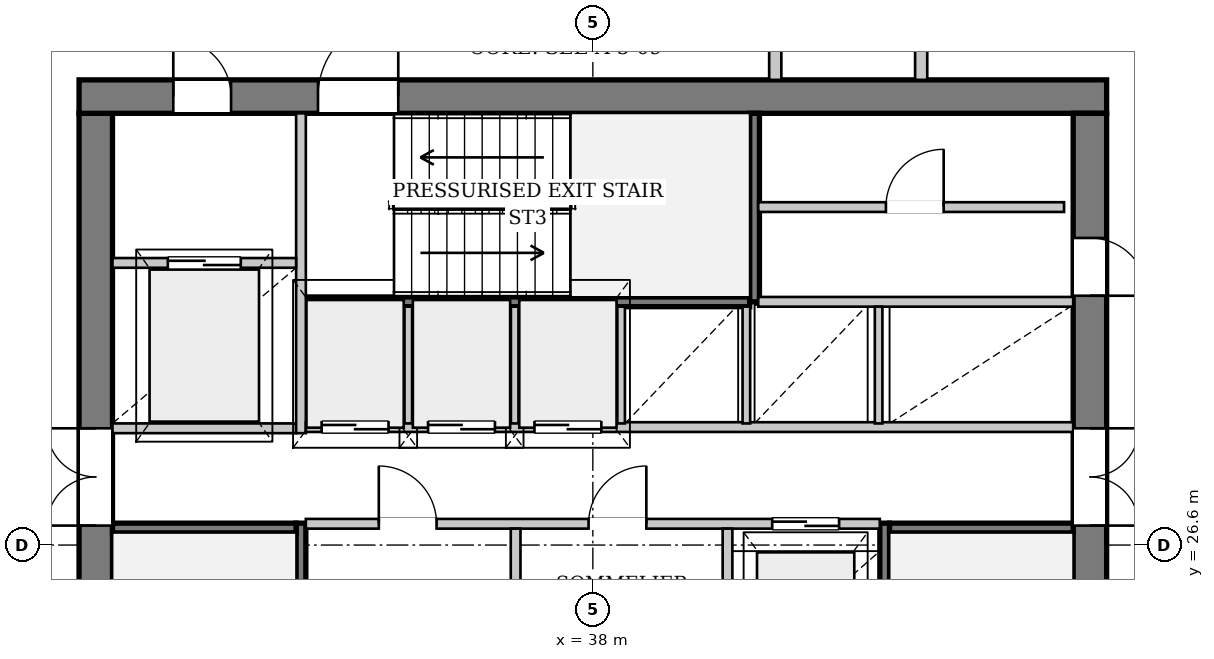
"""IFC4 building model, lengths in metres.
Left out: names, types, materials, properties, quantities, classifications, styles, units other than length and angle.
Written with IfcOpenShell. Run it as: python <this file> out.ifc"""

import sys

from ifc_helpers import new_model, si_unit, direction, frame, frame_2d, origin, place, context, subcontext, project, spatial, rectangle, extrude, source, transform, mapped, element, fill, save


model = new_model("IFC4")
c1 = context("Model", 3, precision=1e-05, world=origin(), true_north=direction((0.0, 1.0)))
c2 = subcontext(c1, "Body", "Model", "MODEL_VIEW")
j1 = project(units=[si_unit("LENGTHUNIT", "METRE"), si_unit("PLANEANGLEUNIT", "RADIAN")], contexts=[c1])
p1 = place(None, origin())
s1 = spatial("IfcSite", under=j1, at=p1, CompositionType="ELEMENT")
p2 = place(p1, origin())
s2 = spatial("IfcBuilding", under=s1, at=p2, CompositionType="ELEMENT")
p3 = place(p2, frame((0.0, 0.0, 160.8)))
s3 = spatial("IfcBuildingStorey", under=s2, at=p3, CompositionType="ELEMENT", Elevation=160.8)
p4 = place(p3, frame((29.825, 19.5, 0.0), z_axis=(0.0, 0.0, 1.0), x_axis=(0.0, 1.0, 0.0)))
e1 = element("IfcWall", 1, at=p4, inside=s3, PredefinedType="SHEAR", context=c2, shape_type="SweptSolid", body=[
    extrude(rectangle(XDim=14.2, YDim=0.55, at=frame_2d((7.1, 0.0))), origin(), (0.0, 0.0, 1.0), 3.33),
])
p5 = place(p4, frame((7.42, 0.0, 0.0)))
e2 = element("IfcOpeningElement", 2, at=p5, cuts=e1, PredefinedType="OPENING", context=c2, shape_type="SweptSolid", body=[
    extrude(rectangle(XDim=1.6, YDim=2.2, at=frame_2d((0.8, 1.1))), frame((0.0, 0.285, 0.0), z_axis=(0.0, -1.0, 0.0), x_axis=(1.0, 0.0, 0.0)), (0.0, 0.0, 1.0), 0.57),
])
p6 = place(p3, frame((29.55, 33.975, 0.0), z_axis=(0.0, 0.0, 1.0), x_axis=(1.0, 0.0, 0.0)))
e3 = element("IfcWall", 3, at=p6, inside=s3, PredefinedType="SHEAR", context=c2, shape_type="SweptSolid", body=[
    extrude(rectangle(XDim=16.9, YDim=0.55, at=frame_2d((8.45, 0.0))), origin(), (0.0, 0.0, 1.0), 3.33),
])
p7 = place(p6, frame((1.55, 0.0, 0.0)))
e4 = element("IfcOpeningElement", 4, at=p7, cuts=e3, PredefinedType="OPENING", context=c2, shape_type="SweptSolid", body=[
    extrude(rectangle(XDim=0.95, YDim=2.1, at=frame_2d((0.475, 1.05))), frame((0.0, 0.285, 0.0), z_axis=(0.0, -1.0, 0.0), x_axis=(1.0, 0.0, 0.0)), (0.0, 0.0, 1.0), 0.57),
])
p8 = place(p6, frame((3.93, 0.0, 0.0)))
e5 = element("IfcOpeningElement", 5, at=p8, cuts=e3, PredefinedType="OPENING", context=c2, shape_type="SweptSolid", body=[
    extrude(rectangle(XDim=1.32, YDim=2.2, at=frame_2d((0.66, 1.1))), frame((0.0, 0.285, 0.0), z_axis=(0.0, -1.0, 0.0), x_axis=(1.0, 0.0, 0.0)), (0.0, 0.0, 1.0), 0.57),
])
p9 = place(p3, frame((46.175, 33.7, 0.0), z_axis=(0.0, 0.0, 1.0), x_axis=(0.0, -1.0, 0.0)))
e6 = element("IfcWall", 6, at=p9, inside=s3, PredefinedType="SHEAR", context=c2, shape_type="SweptSolid", body=[
    extrude(rectangle(XDim=14.2, YDim=0.55, at=frame_2d((7.1, 0.0))), origin(), (0.0, 0.0, 1.0), 3.33),
])
p10 = place(p9, frame((5.18, 0.0, 0.0)))
e7 = element("IfcOpeningElement", 7, at=p10, cuts=e6, PredefinedType="OPENING", context=c2, shape_type="SweptSolid", body=[
    extrude(rectangle(XDim=1.6, YDim=2.2, at=frame_2d((0.8, 1.1))), frame((0.0, 0.285, 0.0), z_axis=(0.0, -1.0, 0.0), x_axis=(1.0, 0.0, 0.0)), (0.0, 0.0, 1.0), 0.57),
])
p11 = place(p9, frame((2.05, 0.0, 0.0)))
e8 = element("IfcOpeningElement", 8, at=p11, cuts=e6, PredefinedType="OPENING", context=c2, shape_type="SweptSolid", body=[
    extrude(rectangle(XDim=0.95, YDim=2.1, at=frame_2d((0.475, 1.05))), frame((0.0, 0.285, 0.0), z_axis=(0.0, -1.0, 0.0), x_axis=(1.0, 0.0, 0.0)), (0.0, 0.0, 1.0), 0.57),
])
p12 = place(p3, frame((33.2, 19.5, 0.0), z_axis=(0.0, 0.0, 1.0), x_axis=(0.0, 1.0, 0.0)))
e9 = element("IfcWall", 9, at=p12, inside=s3, PredefinedType="PARTITIONING", context=c2, shape_type="SweptSolid", body=[
    extrude(rectangle(XDim=7.46, YDim=0.16, at=frame_2d((3.73, 0.0))), origin(), (0.0, 0.0, 1.0), 3.33),
])
p13 = place(p12, frame((0.08, 0.0, 0.0)))
e10 = element("IfcOpeningElement", 10, at=p13, cuts=e9, PredefinedType="OPENING", context=c2, shape_type="SweptSolid", body=[
    extrude(rectangle(XDim=1.32, YDim=2.2, at=frame_2d((0.66, 1.1))), frame((0.0, 0.09, 0.0), z_axis=(0.0, -1.0, 0.0), x_axis=(1.0, 0.0, 0.0)), (0.0, 0.0, 1.0), 0.18),
])
p14 = place(p3, frame((30.1, 26.88, 0.0), z_axis=(0.0, 0.0, 1.0), x_axis=(1.0, 0.0, 0.0)))
e11 = element("IfcWall", 11, at=p14, inside=s3, PredefinedType="PARTITIONING", context=c2, shape_type="SweptSolid", body=[
    extrude(rectangle(XDim=3.02, YDim=0.16, at=frame_2d((1.51, 0.0))), origin(), (0.0, 0.0, 1.0), 3.33),
])
p15 = place(p3, frame((42.8, 26.96, 0.0), z_axis=(0.0, 0.0, 1.0), x_axis=(0.0, -1.0, 0.0)))
e12 = element("IfcWall", 12, at=p15, inside=s3, PredefinedType="PARTITIONING", context=c2, shape_type="SweptSolid", body=[
    extrude(rectangle(XDim=7.46, YDim=0.16, at=frame_2d((3.73, 0.0))), origin(), (0.0, 0.0, 1.0), 3.33),
])
p16 = place(p15, frame((6.06, 0.0, 0.0)))
e13 = element("IfcOpeningElement", 13, at=p16, cuts=e12, PredefinedType="OPENING", context=c2, shape_type="SweptSolid", body=[
    extrude(rectangle(XDim=1.32, YDim=2.2, at=frame_2d((0.66, 1.1))), frame((0.0, 0.09, 0.0), z_axis=(0.0, -1.0, 0.0), x_axis=(1.0, 0.0, 0.0)), (0.0, 0.0, 1.0), 0.18),
])
p17 = place(p3, frame((42.88, 26.88, 0.0), z_axis=(0.0, 0.0, 1.0), x_axis=(1.0, 0.0, 0.0)))
e14 = element("IfcWall", 14, at=p17, inside=s3, PredefinedType="PARTITIONING", context=c2, shape_type="SweptSolid", body=[
    extrude(rectangle(XDim=3.02, YDim=0.16, at=frame_2d((1.51, 0.0))), origin(), (0.0, 0.0, 1.0), 3.33),
])
p18 = place(p3, frame((33.28, 30.6, 0.0), z_axis=(0.0, 0.0, 1.0), x_axis=(1.0, 0.0, 0.0)))
e15 = element("IfcWall", 15, at=p18, inside=s3, PredefinedType="PARTITIONING", context=c2, shape_type="SweptSolid", body=[
    extrude(rectangle(XDim=7.3, YDim=0.16, at=frame_2d((3.65, 0.0))), origin(), (0.0, 0.0, 1.0), 3.33),
])
p19 = place(p3, frame((40.66, 30.6, 0.0), z_axis=(0.0, 0.0, 1.0), x_axis=(0.0, 1.0, 0.0)))
e16 = element("IfcWall", 16, at=p19, inside=s3, PredefinedType="PARTITIONING", context=c2, shape_type="SweptSolid", body=[
    extrude(rectangle(XDim=3.1, YDim=0.16, at=frame_2d((1.55, 0.0))), origin(), (0.0, 0.0, 1.0), 3.33),
])
p20 = place(p3, frame((30.1, 28.52, 0.0), z_axis=(0.0, 0.0, 1.0), x_axis=(1.0, 0.0, 0.0)))
e17 = element("IfcWall", 17, at=p20, inside=s3, PredefinedType="PARTITIONING", context=c2, shape_type="SweptSolid", body=[
    extrude(rectangle(XDim=3.02, YDim=0.16, at=frame_2d((1.51, 0.0))), origin(), (0.0, 0.0, 1.0), 3.33),
])
p21 = place(p3, frame((33.2, 28.44, 0.0), z_axis=(0.0, 0.0, 1.0), x_axis=(0.0, 1.0, 0.0)))
e18 = element("IfcWall", 18, at=p21, inside=s3, PredefinedType="PARTITIONING", context=c2, shape_type="SweptSolid", body=[
    extrude(rectangle(XDim=5.26, YDim=0.16, at=frame_2d((2.63, 0.0))), origin(), (0.0, 0.0, 1.0), 3.33),
])
p22 = place(p3, frame((30.1, 31.24, 0.0), z_axis=(0.0, 0.0, 1.0), x_axis=(1.0, 0.0, 0.0)))
e19 = element("IfcWall", 19, at=p22, inside=s3, PredefinedType="PARTITIONING", context=c2, shape_type="SweptSolid", body=[
    extrude(rectangle(XDim=3.02, YDim=0.16, at=frame_2d((1.51, 0.0))), origin(), (0.0, 0.0, 1.0), 3.33),
])
p23 = place(p22, frame((0.91, 0.0, 0.0)))
e20 = element("IfcOpeningElement", 20, at=p23, cuts=e19, PredefinedType="OPENING", context=c2, shape_type="SweptSolid", body=[
    extrude(rectangle(XDim=1.2, YDim=2.2, at=frame_2d((0.6, 1.1))), frame((0.0, 0.09, 0.0), z_axis=(0.0, -1.0, 0.0), x_axis=(1.0, 0.0, 0.0)), (0.0, 0.0, 1.0), 0.18),
])
p24 = place(p3, frame((33.28, 26.95, 0.0), z_axis=(0.0, 0.0, 1.0), x_axis=(1.0, 0.0, 0.0)))
e21 = element("IfcWall", 21, at=p24, inside=s3, PredefinedType="PARTITIONING", context=c2, shape_type="SweptSolid", body=[
    extrude(rectangle(XDim=9.44, YDim=0.16, at=frame_2d((4.72, 0.0))), origin(), (0.0, 0.0, 1.0), 3.33),
])
p25 = place(p24, frame((1.2, 0.0, 0.0)))
e22 = element("IfcOpeningElement", 22, at=p25, cuts=e21, PredefinedType="OPENING", context=c2, shape_type="SweptSolid", body=[
    extrude(rectangle(XDim=0.95, YDim=2.1, at=frame_2d((0.475, 1.05))), frame((0.0, 0.09, 0.0), z_axis=(0.0, -1.0, 0.0), x_axis=(1.0, 0.0, 0.0)), (0.0, 0.0, 1.0), 0.18),
])
p26 = place(p24, frame((4.65, 0.0, 0.0)))
e23 = element("IfcOpeningElement", 23, at=p26, cuts=e21, PredefinedType="OPENING", context=c2, shape_type="SweptSolid", body=[
    extrude(rectangle(XDim=0.95, YDim=2.1, at=frame_2d((0.475, 1.05))), frame((0.0, 0.09, 0.0), z_axis=(0.0, -1.0, 0.0), x_axis=(1.0, 0.0, 0.0)), (0.0, 0.0, 1.0), 0.18),
])
p27 = place(p24, frame((7.67, 0.0, 0.0)))
e24 = element("IfcOpeningElement", 24, at=p27, cuts=e21, PredefinedType="OPENING", context=c2, shape_type="SweptSolid", body=[
    extrude(rectangle(XDim=1.1, YDim=2.2, at=frame_2d((0.55, 1.1))), frame((0.0, 0.09, 0.0), z_axis=(0.0, -1.0, 0.0), x_axis=(1.0, 0.0, 0.0)), (0.0, 0.0, 1.0), 0.18),
])
for number, where, z_axis, x_axis in (
    (25, (36.73, 24.56, 0.0), (0.0, 0.0, 1.0), (0.0, 1.0, 0.0)),
    (26, (40.215, 24.56, 0.0), (0.0, 0.0, 1.0), (0.0, 1.0, 0.0)),
):
    element("IfcWall", number, at=place(p3, frame(where, z_axis=z_axis, x_axis=x_axis)), inside=s3, PredefinedType="PARTITIONING", context=c2, shape_type="SweptSolid", body=[
        extrude(rectangle(XDim=2.31, YDim=0.16, at=frame_2d((1.155, 0.0))), origin(), (0.0, 0.0, 1.0), 3.33),
    ])
p28 = place(p3, frame((33.28, 28.54, 0.0), z_axis=(0.0, 0.0, 1.0), x_axis=(1.0, 0.0, 0.0)))
e27 = element("IfcWall", 27, at=p28, inside=s3, PredefinedType="PARTITIONING", context=c2, shape_type="SweptSolid", body=[
    extrude(rectangle(XDim=12.62, YDim=0.16, at=frame_2d((6.31, 0.0))), origin(), (0.0, 0.0, 1.0), 3.33),
])
p29 = place(p28, frame((0.26, 0.0, 0.0)))
e28 = element("IfcOpeningElement", 28, at=p29, cuts=e27, PredefinedType="OPENING", context=c2, shape_type="SweptSolid", body=[
    extrude(rectangle(XDim=1.1, YDim=2.2, at=frame_2d((0.55, 1.1))), frame((0.0, 0.09, 0.0), z_axis=(0.0, -1.0, 0.0), x_axis=(1.0, 0.0, 0.0)), (0.0, 0.0, 1.0), 0.18),
])
p30 = place(p28, frame((2.01, 0.0, 0.0)))
e29 = element("IfcOpeningElement", 29, at=p30, cuts=e27, PredefinedType="OPENING", context=c2, shape_type="SweptSolid", body=[
    extrude(rectangle(XDim=1.1, YDim=2.2, at=frame_2d((0.55, 1.1))), frame((0.0, 0.09, 0.0), z_axis=(0.0, -1.0, 0.0), x_axis=(1.0, 0.0, 0.0)), (0.0, 0.0, 1.0), 0.18),
])
p31 = place(p28, frame((3.76, 0.0, 0.0)))
e30 = element("IfcOpeningElement", 30, at=p31, cuts=e27, PredefinedType="OPENING", context=c2, shape_type="SweptSolid", body=[
    extrude(rectangle(XDim=1.1, YDim=2.2, at=frame_2d((0.55, 1.1))), frame((0.0, 0.09, 0.0), z_axis=(0.0, -1.0, 0.0), x_axis=(1.0, 0.0, 0.0)), (0.0, 0.0, 1.0), 0.18),
])
p32 = place(p3, frame((40.72, 30.6, 0.0), z_axis=(0.0, 0.0, 1.0), x_axis=(1.0, 0.0, 0.0)))
e31 = element("IfcWall", 31, at=p32, inside=s3, PredefinedType="PARTITIONING", context=c2, shape_type="SweptSolid", body=[
    extrude(rectangle(XDim=5.18, YDim=0.16, at=frame_2d((2.59, 0.0))), origin(), (0.0, 0.0, 1.0), 3.33),
])
for number, where, z_axis, x_axis in (
    (32, (34.965, 28.6, 0.0), (0.0, 0.0, 1.0), (0.0, 1.0, 0.0)),
    (33, (36.715, 28.6, 0.0), (0.0, 0.0, 1.0), (0.0, 1.0, 0.0)),
    (34, (38.465, 28.6, 0.0), (0.0, 0.0, 1.0), (0.0, 1.0, 0.0)),
    (35, (40.525, 28.6, 0.0), (0.0, 0.0, 1.0), (0.0, 1.0, 0.0)),
    (36, (42.7, 28.6, 0.0), (0.0, 0.0, 1.0), (0.0, 1.0, 0.0)),
):
    element("IfcWall", number, at=place(p3, frame(where, z_axis=z_axis, x_axis=x_axis)), inside=s3, PredefinedType="PARTITIONING", context=c2, shape_type="SweptSolid", body=[
        extrude(rectangle(XDim=1.92, YDim=0.125, at=frame_2d((0.96, 0.0))), origin(), (0.0, 0.0, 1.0), 3.33),
    ])
p33 = place(p3, frame((40.72, 32.158, 0.0), z_axis=(0.0, 0.0, 1.0), x_axis=(1.0, 0.0, 0.0)))
e37 = element("IfcWall", 37, at=p33, inside=s3, PredefinedType="PARTITIONING", context=c2, shape_type="SweptSolid", body=[
    extrude(rectangle(XDim=5.03, YDim=0.16, at=frame_2d((2.515, 0.0))), origin(), (0.0, 0.0, 1.0), 3.33),
])
p34 = place(p33, frame((2.1, 0.0, 0.0)))
e38 = element("IfcOpeningElement", 38, at=p34, cuts=e37, PredefinedType="OPENING", context=c2, shape_type="SweptSolid", body=[
    extrude(rectangle(XDim=0.95, YDim=2.1, at=frame_2d((0.475, 1.05))), frame((0.0, 0.09, 0.0), z_axis=(0.0, -1.0, 0.0), x_axis=(1.0, 0.0, 0.0)), (0.0, 0.0, 1.0), 0.18),
])
for number, where, z_axis, x_axis in (
    (39, (41.0, 34.25, 0.0), (0.0, 0.0, 1.0), (0.0, 1.0, 0.0)),
    (40, (43.4, 34.25, 0.0), (0.0, 0.0, 1.0), (0.0, 1.0, 0.0)),
):
    element("IfcWall", number, at=place(p3, frame(where, z_axis=z_axis, x_axis=x_axis)), inside=s3, PredefinedType="PARTITIONING", context=c2, shape_type="SweptSolid", body=[
        extrude(rectangle(XDim=1.95, YDim=0.2, at=frame_2d((0.975, 0.0))), origin(), (0.0, 0.0, 1.0), 3.33),
    ])
m1 = source(origin(), c2, "Body", "SweptSolid", [
    extrude(rectangle(XDim=1.6, YDim=2.2, at=frame_2d((0.8, 1.1))), frame((0.0, 0.025, 0.0), z_axis=(0.0, -1.0, 0.0), x_axis=(1.0, 0.0, 0.0)), (0.0, 0.0, 1.0), 0.05),
])
p35 = place(p5, origin())
e41 = element("IfcDoor", 41, at=p35, inside=s3, OperationType="DOUBLE_DOOR_SINGLE_SWING", PredefinedType="DOOR", context=c2, shape_type="MappedRepresentation", body=[
    mapped(m1, transform((0.0, 0.0, 0.0), x_axis=(1.0, 0.0, 0.0), y_axis=(0.0, 1.0, 0.0), z_axis=(0.0, 0.0, 1.0), scale=1.0)),
])
fill(e2, e41)
m2 = source(origin(), c2, "Body", "SweptSolid", [
    extrude(rectangle(XDim=0.95, YDim=2.1, at=frame_2d((0.475, 1.05))), frame((0.0, 0.025, 0.0), z_axis=(0.0, -1.0, 0.0), x_axis=(1.0, 0.0, 0.0)), (0.0, 0.0, 1.0), 0.05),
])
p36 = place(p7, origin())
e42 = element("IfcDoor", 42, at=p36, inside=s3, OperationType="SINGLE_SWING_LEFT", PredefinedType="DOOR", context=c2, shape_type="MappedRepresentation", body=[
    mapped(m2, transform((0.0, 0.0, 0.0), x_axis=(1.0, 0.0, 0.0), y_axis=(0.0, 1.0, 0.0), z_axis=(0.0, 0.0, 1.0), scale=1.0)),
])
fill(e4, e42)
m3 = source(origin(), c2, "Body", "SweptSolid", [
    extrude(rectangle(XDim=1.32, YDim=2.2, at=frame_2d((0.66, 1.1))), frame((0.0, 0.025, 0.0), z_axis=(0.0, -1.0, 0.0), x_axis=(1.0, 0.0, 0.0)), (0.0, 0.0, 1.0), 0.05),
])
p37 = place(p8, origin())
e43 = element("IfcDoor", 43, at=p37, inside=s3, OperationType="SINGLE_SWING_RIGHT", PredefinedType="DOOR", context=c2, shape_type="MappedRepresentation", body=[
    mapped(m3, transform((0.0, 0.0, 0.0), x_axis=(1.0, 0.0, 0.0), y_axis=(0.0, 1.0, 0.0), z_axis=(0.0, 0.0, 1.0), scale=1.0)),
])
fill(e5, e43)
p38 = place(p10, origin())
e44 = element("IfcDoor", 44, at=p38, inside=s3, OperationType="DOUBLE_DOOR_SINGLE_SWING", PredefinedType="DOOR", context=c2, shape_type="MappedRepresentation", body=[
    mapped(m1, transform((0.0, 0.0, 0.0), x_axis=(1.0, 0.0, 0.0), y_axis=(0.0, 1.0, 0.0), z_axis=(0.0, 0.0, 1.0), scale=1.0)),
])
fill(e7, e44)
m4 = source(origin(), c2, "Body", "SweptSolid", [
    extrude(rectangle(XDim=1.2, YDim=2.2, at=frame_2d((0.6, 1.1))), frame((0.0, 0.025, 0.0), z_axis=(0.0, -1.0, 0.0), x_axis=(1.0, 0.0, 0.0)), (0.0, 0.0, 1.0), 0.05),
])
p39 = place(p23, origin())
e45 = element("IfcDoor", 45, at=p39, inside=s3, OperationType="DOUBLE_DOOR_SLIDING", PredefinedType="DOOR", context=c2, shape_type="MappedRepresentation", body=[
    mapped(m4, transform((0.0, 0.0, 0.0), x_axis=(1.0, 0.0, 0.0), y_axis=(0.0, 1.0, 0.0), z_axis=(0.0, 0.0, 1.0), scale=1.0)),
])
fill(e20, e45)
p40 = place(p25, origin())
e46 = element("IfcDoor", 46, at=p40, inside=s3, OperationType="SINGLE_SWING_LEFT", PredefinedType="DOOR", context=c2, shape_type="MappedRepresentation", body=[
    mapped(m2, transform((0.0, 0.0, 0.0), x_axis=(1.0, 0.0, 0.0), y_axis=(0.0, 1.0, 0.0), z_axis=(0.0, 0.0, 1.0), scale=1.0)),
])
fill(e22, e46)
p41 = place(p26, origin())
e47 = element("IfcDoor", 47, at=p41, inside=s3, OperationType="SINGLE_SWING_RIGHT", PredefinedType="DOOR", context=c2, shape_type="MappedRepresentation", body=[
    mapped(m2, transform((0.0, 0.0, 0.0), x_axis=(1.0, 0.0, 0.0), y_axis=(0.0, 1.0, 0.0), z_axis=(0.0, 0.0, 1.0), scale=1.0)),
])
fill(e23, e47)
m5 = source(origin(), c2, "Body", "SweptSolid", [
    extrude(rectangle(XDim=1.1, YDim=2.2, at=frame_2d((0.55, 1.1))), frame((0.0, 0.025, 0.0), z_axis=(0.0, -1.0, 0.0), x_axis=(1.0, 0.0, 0.0)), (0.0, 0.0, 1.0), 0.05),
])
p42 = place(p27, origin())
e48 = element("IfcDoor", 48, at=p42, inside=s3, OperationType="DOUBLE_DOOR_SLIDING", PredefinedType="DOOR", context=c2, shape_type="MappedRepresentation", body=[
    mapped(m5, transform((0.0, 0.0, 0.0), x_axis=(1.0, 0.0, 0.0), y_axis=(0.0, 1.0, 0.0), z_axis=(0.0, 0.0, 1.0), scale=1.0)),
])
fill(e24, e48)
p43 = place(p29, origin())
e49 = element("IfcDoor", 49, at=p43, inside=s3, OperationType="DOUBLE_DOOR_SLIDING", PredefinedType="DOOR", context=c2, shape_type="MappedRepresentation", body=[
    mapped(m5, transform((0.0, 0.0, 0.0), x_axis=(1.0, 0.0, 0.0), y_axis=(0.0, 1.0, 0.0), z_axis=(0.0, 0.0, 1.0), scale=1.0)),
])
fill(e28, e49)
p44 = place(p30, origin())
e50 = element("IfcDoor", 50, at=p44, inside=s3, OperationType="DOUBLE_DOOR_SLIDING", PredefinedType="DOOR", context=c2, shape_type="MappedRepresentation", body=[
    mapped(m5, transform((0.0, 0.0, 0.0), x_axis=(1.0, 0.0, 0.0), y_axis=(0.0, 1.0, 0.0), z_axis=(0.0, 0.0, 1.0), scale=1.0)),
])
fill(e29, e50)
p45 = place(p31, origin())
e51 = element("IfcDoor", 51, at=p45, inside=s3, OperationType="DOUBLE_DOOR_SLIDING", PredefinedType="DOOR", context=c2, shape_type="MappedRepresentation", body=[
    mapped(m5, transform((0.0, 0.0, 0.0), x_axis=(1.0, 0.0, 0.0), y_axis=(0.0, 1.0, 0.0), z_axis=(0.0, 0.0, 1.0), scale=1.0)),
])
fill(e30, e51)
p46 = place(p34, origin())
e52 = element("IfcDoor", 52, at=p46, inside=s3, OperationType="SINGLE_SWING_RIGHT", PredefinedType="DOOR", context=c2, shape_type="MappedRepresentation", body=[
    mapped(m2, transform((0.0, 0.0, 0.0), x_axis=(1.0, 0.0, 0.0), y_axis=(0.0, 1.0, 0.0), z_axis=(0.0, 0.0, 1.0), scale=1.0)),
])
fill(e38, e52)
p47 = place(p11, origin())
e53 = element("IfcDoor", 53, at=p47, inside=s3, OperationType="SINGLE_SWING_RIGHT", PredefinedType="DOOR", context=c2, shape_type="MappedRepresentation", body=[
    mapped(m2, transform((0.0, 0.0, 0.0), x_axis=(1.0, 0.0, 0.0), y_axis=(0.0, 1.0, 0.0), z_axis=(0.0, 0.0, 1.0), scale=1.0)),
])
fill(e8, e53)
save(model, sys.argv[1])
